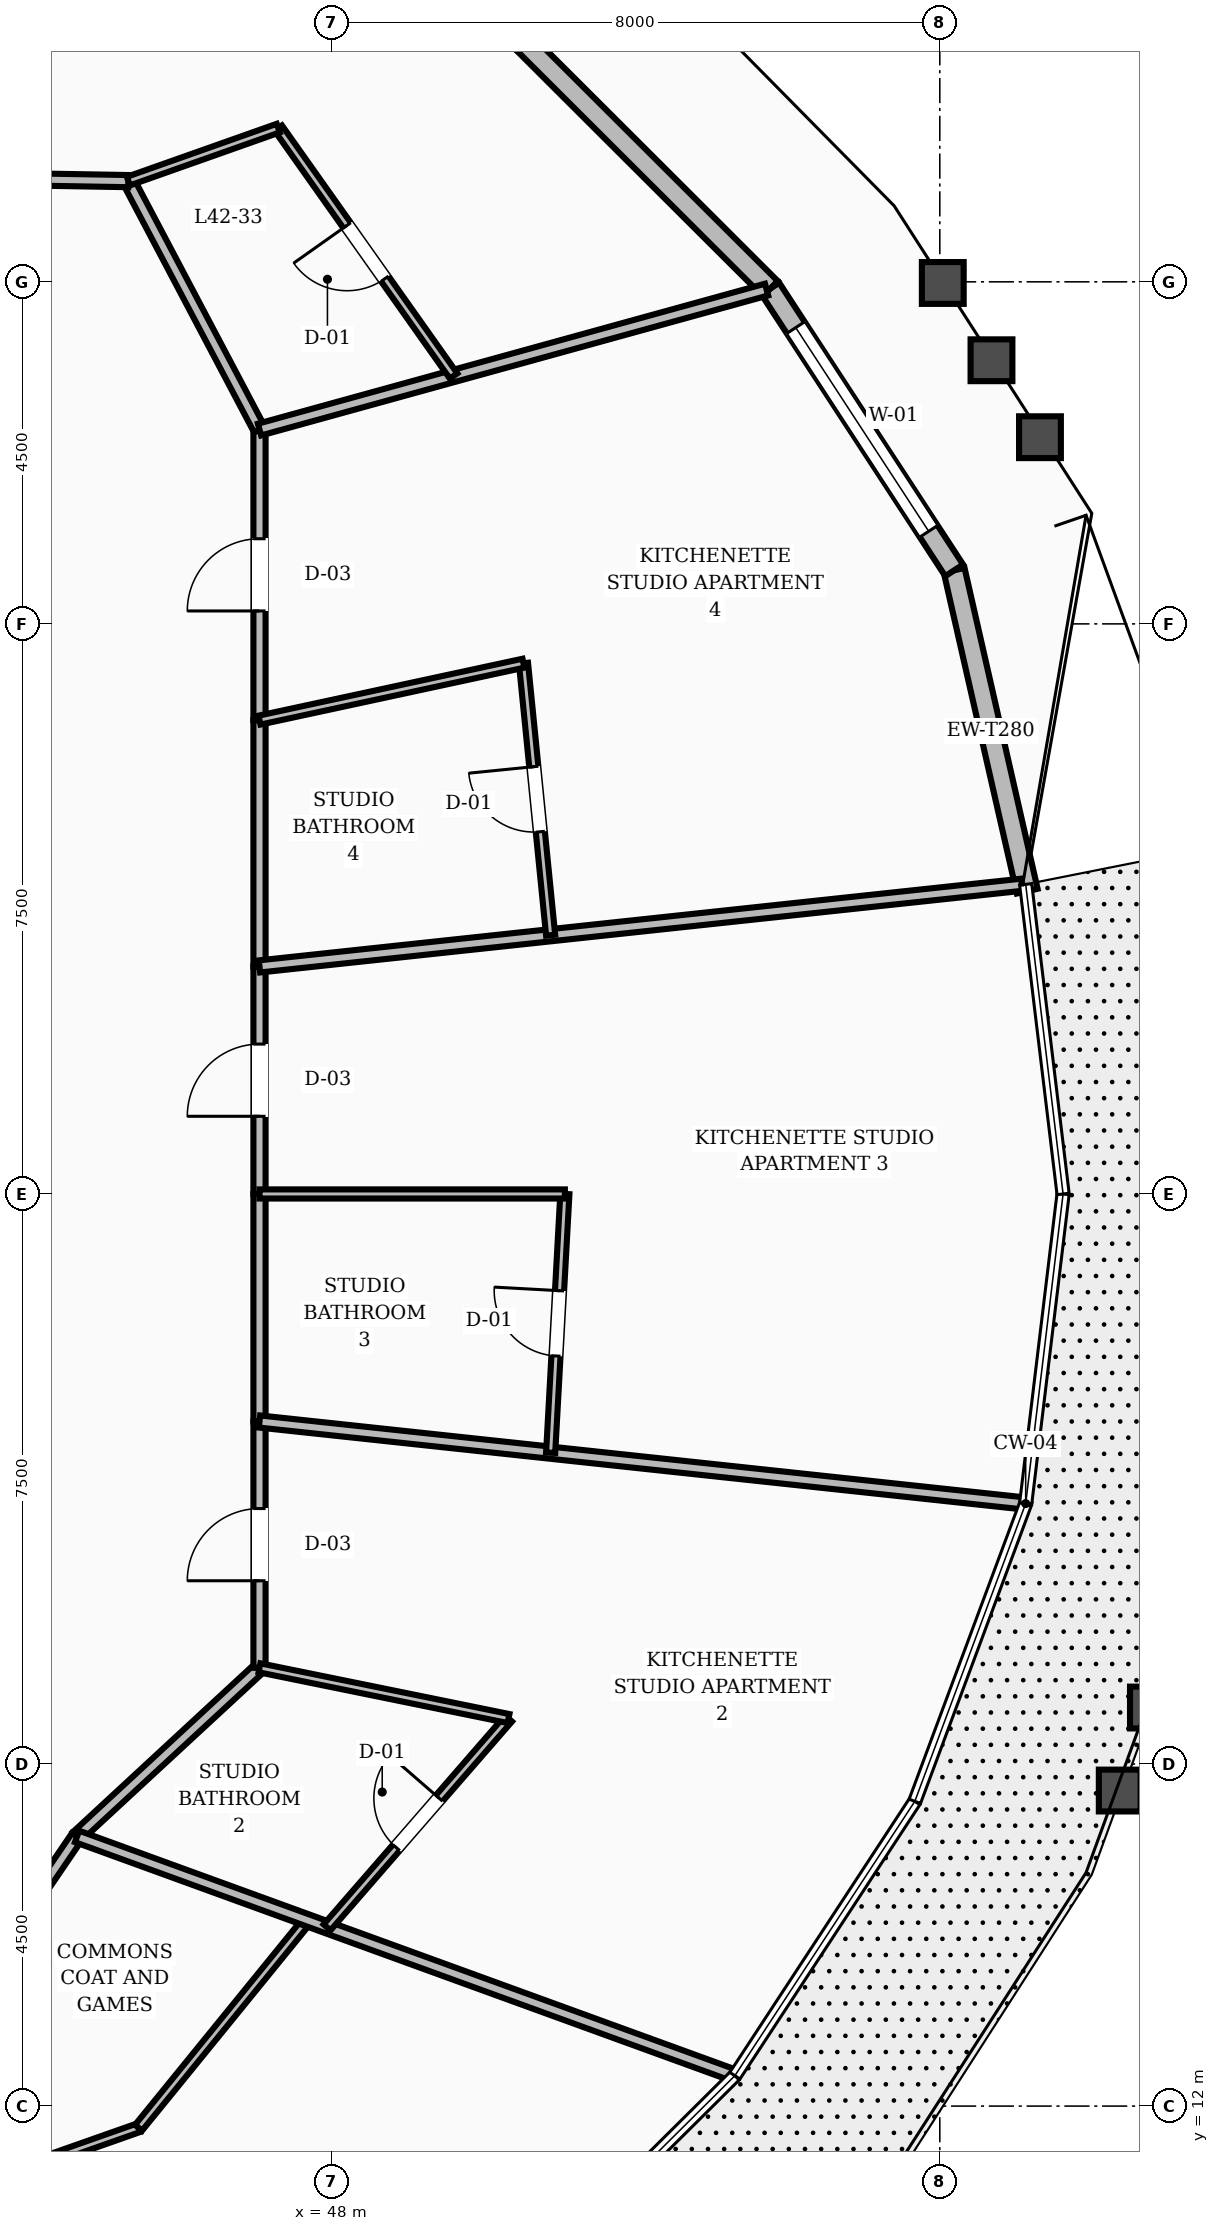
"""IFC4 building model, lengths in metres.
Left out: names, types, materials, properties, quantities, classifications, styles, units other than length and angle.
Written with IfcOpenShell. Run it as: python <this file> out.ifc"""

import sys

from ifc_helpers import new_model, si_unit, direction, frame, frame_2d, origin, place, context, subcontext, project, spatial, rectangle, extrude, element, fill, save


model = new_model("IFC4")
c1 = context("Model", 3, precision=1e-05, world=origin(), true_north=direction((0.0, 1.0)))
c2 = subcontext(c1, "Body", "Model", "MODEL_VIEW")
j1 = project(units=[si_unit("LENGTHUNIT", "METRE"), si_unit("PLANEANGLEUNIT", "RADIAN")], contexts=[c1])
p1 = place(None, origin())
s1 = spatial("IfcSite", under=j1, at=p1, CompositionType="ELEMENT")
p2 = place(p1, origin())
s2 = spatial("IfcBuilding", under=s1, at=p2, CompositionType="ELEMENT")
p3 = place(p2, frame((0.0, 0.0, 164.0)))
s3 = spatial("IfcBuildingStorey", under=s2, at=p3, CompositionType="ELEMENT", Elevation=164.0)
p4 = place(p3, frame((57.15, 27.984, 0.0), z_axis=(0.0, 0.0, 1.0), x_axis=(-0.222033033123, 0.975039143933, 0.0)))
e1 = element("IfcWall", 1, at=p4, inside=s3, PredefinedType="STANDARD", context=c2, shape_type="SweptSolid", body=[
    extrude(rectangle(XDim=4.329, YDim=0.28, at=frame_2d((2.165, 0.0))), origin(), (0.0, 0.0, 1.0), 2.82),
])
p5 = place(p3, frame((56.189, 32.205, 0.0), z_axis=(0.0, 0.0, 1.0), x_axis=(-0.546604237051, 0.837391072342, 0.0)))
e2 = element("IfcWall", 2, at=p5, inside=s3, PredefinedType="STANDARD", context=c2, shape_type="SweptSolid", body=[
    extrude(rectangle(XDim=4.426, YDim=0.28, at=frame_2d((2.213, 0.0))), origin(), (0.0, 0.0, 1.0), 2.82),
])
p6 = place(p5, frame((0.613, 0.0, 0.8)))
e3 = element("IfcOpeningElement", 3, at=p6, cuts=e2, PredefinedType="OPENING", context=c2, shape_type="SweptSolid", body=[
    extrude(rectangle(XDim=3.2, YDim=1.65, at=frame_2d((1.6, 0.825))), frame((0.0, 0.15, 0.0), z_axis=(0.0, -1.0, 0.0), x_axis=(1.0, 0.0, 0.0)), (0.0, 0.0, 1.0), 0.3),
])
p7 = place(p3, frame((53.77, 35.911, 0.0), z_axis=(0.0, 0.0, 1.0), x_axis=(-0.70790250433, 0.706310161589, 0.0)))
e4 = element("IfcWall", 4, at=p7, inside=s3, PredefinedType="STANDARD", context=c2, shape_type="SweptSolid", body=[
    extrude(rectangle(XDim=4.6, YDim=0.28, at=frame_2d((2.3, 0.0))), origin(), (0.0, 0.0, 1.0), 2.82),
])
p8 = place(p3, frame((47.05, 24.0, 0.0), z_axis=(0.0, 0.0, 1.0), x_axis=(0.0, 1.0, 0.0)))
e5 = element("IfcWall", 5, at=p8, inside=s3, PredefinedType="SOLIDWALL", context=c2, shape_type="SweptSolid", body=[
    extrude(rectangle(XDim=2.994, YDim=0.16, at=frame_2d((1.497, 0.0))), origin(), (0.0, 0.0, 1.0), 2.8),
])
p9 = place(p8, frame((1.022, 0.0, 0.0)))
e6 = element("IfcOpeningElement", 6, at=p9, cuts=e5, PredefinedType="OPENING", context=c2, shape_type="SweptSolid", body=[
    extrude(rectangle(XDim=0.95, YDim=2.1, at=frame_2d((0.475, 1.05))), frame((0.0, 0.09, 0.0), z_axis=(0.0, -1.0, 0.0), x_axis=(1.0, 0.0, 0.0)), (0.0, 0.0, 1.0), 0.18),
])
p10 = place(p3, frame((47.05, 26.994, 0.0), z_axis=(0.0, 0.0, 1.0), x_axis=(0.0, 1.0, 0.0)))
e7 = element("IfcWall", 7, at=p10, inside=s3, PredefinedType="SOLIDWALL", context=c2, shape_type="SweptSolid", body=[
    extrude(rectangle(XDim=3.24, YDim=0.16, at=frame_2d((1.62, 0.0))), origin(), (0.0, 0.0, 1.0), 2.8),
])
p11 = place(p3, frame((47.05, 30.234, 0.0), z_axis=(0.0, 0.0, 1.0), x_axis=(0.0, 1.0, 0.0)))
e8 = element("IfcWall", 8, at=p11, inside=s3, PredefinedType="SOLIDWALL", context=c2, shape_type="SweptSolid", body=[
    extrude(rectangle(XDim=3.822, YDim=0.16, at=frame_2d((1.911, 0.0))), origin(), (0.0, 0.0, 1.0), 2.8),
])
p12 = place(p11, frame((1.436, 0.0, 0.0)))
e9 = element("IfcOpeningElement", 9, at=p12, cuts=e8, PredefinedType="OPENING", context=c2, shape_type="SweptSolid", body=[
    extrude(rectangle(XDim=0.95, YDim=2.1, at=frame_2d((0.475, 1.05))), frame((0.0, 0.09, 0.0), z_axis=(0.0, -1.0, 0.0), x_axis=(1.0, 0.0, 0.0)), (0.0, 0.0, 1.0), 0.18),
])
p13 = place(p3, frame((47.05, 34.056, 0.0), z_axis=(0.0, 0.0, 1.0), x_axis=(-0.466737093093, 0.884396113702, 0.0)))
e10 = element("IfcWall", 10, at=p13, inside=s3, PredefinedType="SOLIDWALL", context=c2, shape_type="SweptSolid", body=[
    extrude(rectangle(XDim=3.696, YDim=0.16, at=frame_2d((1.848, 0.0))), origin(), (0.0, 0.0, 1.0), 2.8),
])
p14 = place(p3, frame((45.325, 37.325, 0.0), z_axis=(0.0, 0.0, 1.0), x_axis=(-0.999853038912, 0.017143528788, 0.0)))
e11 = element("IfcWall", 11, at=p14, inside=s3, PredefinedType="SOLIDWALL", context=c2, shape_type="SweptSolid", body=[
    extrude(rectangle(XDim=4.372, YDim=0.16, at=frame_2d((2.186, 0.0))), origin(), (0.0, 0.0, 1.0), 2.8),
])
p15 = place(p14, frame((1.711, 0.0, 0.0)))
e12 = element("IfcOpeningElement", 12, at=p15, cuts=e11, PredefinedType="OPENING", context=c2, shape_type="SweptSolid", body=[
    extrude(rectangle(XDim=0.95, YDim=2.1, at=frame_2d((0.475, 1.05))), frame((0.0, 0.09, 0.0), z_axis=(0.0, -1.0, 0.0), x_axis=(1.0, 0.0, 0.0)), (0.0, 0.0, 1.0), 0.18),
])
p16 = place(p3, frame((42.95, 13.05, 0.0), z_axis=(0.0, 0.0, 1.0), x_axis=(0.562674669208, 0.826678423955, 0.0)))
e13 = element("IfcWall", 13, at=p16, inside=s3, PredefinedType="SOLIDWALL", context=c2, shape_type="SweptSolid", body=[
    extrude(rectangle(XDim=3.021, YDim=0.16, at=frame_2d((1.511, 0.0))), origin(), (0.0, 0.0, 1.0), 2.8),
])
p17 = place(p3, frame((44.65, 15.548, 0.0), z_axis=(0.0, 0.0, 1.0), x_axis=(0.734347936521, 0.678773237633, 0.0)))
e14 = element("IfcWall", 14, at=p17, inside=s3, PredefinedType="SOLIDWALL", context=c2, shape_type="SweptSolid", body=[
    extrude(rectangle(XDim=3.268, YDim=0.16, at=frame_2d((1.634, 0.0))), origin(), (0.0, 0.0, 1.0), 2.8),
])
p18 = place(p3, frame((47.05, 17.766, 0.0), z_axis=(0.0, 0.0, 1.0), x_axis=(0.0, 1.0, 0.0)))
e15 = element("IfcWall", 15, at=p18, inside=s3, PredefinedType="SOLIDWALL", context=c2, shape_type="SweptSolid", body=[
    extrude(rectangle(XDim=3.24, YDim=0.16, at=frame_2d((1.62, 0.0))), origin(), (0.0, 0.0, 1.0), 2.8),
])
p19 = place(p18, frame((1.145, 0.0, 0.0)))
e16 = element("IfcOpeningElement", 16, at=p19, cuts=e15, PredefinedType="OPENING", context=c2, shape_type="SweptSolid", body=[
    extrude(rectangle(XDim=0.95, YDim=2.1, at=frame_2d((0.475, 1.05))), frame((0.0, 0.09, 0.0), z_axis=(0.0, -1.0, 0.0), x_axis=(1.0, 0.0, 0.0)), (0.0, 0.0, 1.0), 0.18),
])
p20 = place(p3, frame((47.05, 21.006, 0.0), z_axis=(0.0, 0.0, 1.0), x_axis=(0.0, 1.0, 0.0)))
e17 = element("IfcWall", 17, at=p20, inside=s3, PredefinedType="SOLIDWALL", context=c2, shape_type="SweptSolid", body=[
    extrude(rectangle(XDim=2.994, YDim=0.16, at=frame_2d((1.497, 0.0))), origin(), (0.0, 0.0, 1.0), 2.8),
])
p21 = place(p3, frame((41.955, 10.481, 0.0), z_axis=(0.0, 0.0, 1.0), x_axis=(0.943218228091, 0.332173710875, 0.0)))
e18 = element("IfcWall", 18, at=p21, inside=s3, PredefinedType="PARTITIONING", context=c2, shape_type="SweptSolid", body=[
    extrude(rectangle(XDim=3.715, YDim=0.12, at=frame_2d((1.857, 0.0))), origin(), (0.0, 0.0, 1.0), 2.8),
])
p22 = place(p3, frame((45.459, 11.715, 0.0), z_axis=(0.0, 0.0, 1.0), x_axis=(0.630851136321, 0.775903888251, 0.0)))
e19 = element("IfcWall", 19, at=p22, inside=s3, PredefinedType="PARTITIONING", context=c2, shape_type="SweptSolid", body=[
    extrude(rectangle(XDim=3.519, YDim=0.12, at=frame_2d((1.76, 0.0))), origin(), (0.0, 0.0, 1.0), 2.8),
])
p23 = place(p3, frame((44.65, 15.548, 0.0), z_axis=(0.0, 0.0, 1.0), x_axis=(0.939767737395, -0.341813691579, 0.0)))
e20 = element("IfcWall", 20, at=p23, inside=s3, PredefinedType="SOLIDWALL", context=c2, shape_type="SweptSolid", body=[
    extrude(rectangle(XDim=9.159, YDim=0.16, at=frame_2d((4.58, 0.0))), origin(), (0.0, 0.0, 1.0), 2.8),
])
p24 = place(p3, frame((47.939, 14.351, 0.0), z_axis=(0.0, 0.0, 1.0), x_axis=(0.655979420757, 0.754778775233, 0.0)))
e21 = element("IfcWall", 21, at=p24, inside=s3, PredefinedType="PARTITIONING", context=c2, shape_type="SweptSolid", body=[
    extrude(rectangle(XDim=3.64, YDim=0.12, at=frame_2d((1.82, 0.0))), origin(), (0.0, 0.0, 1.0), 2.8),
])
p25 = place(p24, frame((1.39, 0.0, 0.0)))
e22 = element("IfcOpeningElement", 22, at=p25, cuts=e21, PredefinedType="OPENING", context=c2, shape_type="SweptSolid", body=[
    extrude(rectangle(XDim=0.86, YDim=2.1, at=frame_2d((0.43, 1.05))), frame((0.0, 0.07, 0.0), z_axis=(0.0, -1.0, 0.0), x_axis=(1.0, 0.0, 0.0)), (0.0, 0.0, 1.0), 0.14),
])
p26 = place(p3, frame((47.05, 17.766, 0.0), z_axis=(0.0, 0.0, 1.0), x_axis=(0.97987231708, -0.199625254463, 0.0)))
e23 = element("IfcWall", 23, at=p26, inside=s3, PredefinedType="PARTITIONING", context=c2, shape_type="SweptSolid", body=[
    extrude(rectangle(XDim=3.344, YDim=0.12, at=frame_2d((1.672, 0.0))), origin(), (0.0, 0.0, 1.0), 2.8),
])
p27 = place(p3, frame((47.05, 21.006, 0.0), z_axis=(0.0, 0.0, 1.0), x_axis=(0.994311076529, -0.106515177757, 0.0)))
e24 = element("IfcWall", 24, at=p27, inside=s3, PredefinedType="SOLIDWALL", context=c2, shape_type="SweptSolid", body=[
    extrude(rectangle(XDim=10.087, YDim=0.16, at=frame_2d((5.044, 0.0))), origin(), (0.0, 0.0, 1.0), 2.8),
])
p28 = place(p3, frame((50.88, 20.596, 0.0), z_axis=(0.0, 0.0, 1.0), x_axis=(0.054859165273, 0.998494102129, 0.0)))
e25 = element("IfcWall", 25, at=p28, inside=s3, PredefinedType="PARTITIONING", context=c2, shape_type="SweptSolid", body=[
    extrude(rectangle(XDim=3.409, YDim=0.12, at=frame_2d((1.705, 0.0))), origin(), (0.0, 0.0, 1.0), 2.8),
])
p29 = place(p28, frame((1.274, 0.0, 0.0)))
e26 = element("IfcOpeningElement", 26, at=p29, cuts=e25, PredefinedType="OPENING", context=c2, shape_type="SweptSolid", body=[
    extrude(rectangle(XDim=0.86, YDim=2.1, at=frame_2d((0.43, 1.05))), frame((0.0, 0.07, 0.0), z_axis=(0.0, -1.0, 0.0), x_axis=(1.0, 0.0, 0.0)), (0.0, 0.0, 1.0), 0.14),
])
p30 = place(p3, frame((47.05, 24.0, 0.0), z_axis=(0.0, 0.0, 1.0), x_axis=(1.0, 0.0, 0.0)))
e27 = element("IfcWall", 27, at=p30, inside=s3, PredefinedType="PARTITIONING", context=c2, shape_type="SweptSolid", body=[
    extrude(rectangle(XDim=4.017, YDim=0.12, at=frame_2d((2.009, 0.0))), origin(), (0.0, 0.0, 1.0), 2.8),
])
p31 = place(p3, frame((47.05, 26.994, 0.0), z_axis=(0.0, 0.0, 1.0), x_axis=(0.994311076529, 0.106515177757, 0.0)))
e28 = element("IfcWall", 28, at=p31, inside=s3, PredefinedType="SOLIDWALL", context=c2, shape_type="SweptSolid", body=[
    extrude(rectangle(XDim=10.087, YDim=0.16, at=frame_2d((5.044, 0.0))), origin(), (0.0, 0.0, 1.0), 2.8),
])
p32 = place(p3, frame((50.88, 27.404, 0.0), z_axis=(0.0, 0.0, 1.0), x_axis=(-0.099376023533, 0.995049951483, 0.0)))
e29 = element("IfcWall", 29, at=p32, inside=s3, PredefinedType="PARTITIONING", context=c2, shape_type="SweptSolid", body=[
    extrude(rectangle(XDim=3.597, YDim=0.12, at=frame_2d((1.798, 0.0))), origin(), (0.0, 0.0, 1.0), 2.8),
])
p33 = place(p32, frame((1.368, 0.0, 0.0)))
e30 = element("IfcOpeningElement", 30, at=p33, cuts=e29, PredefinedType="OPENING", context=c2, shape_type="SweptSolid", body=[
    extrude(rectangle(XDim=0.86, YDim=2.1, at=frame_2d((0.43, 1.05))), frame((0.0, 0.07, 0.0), z_axis=(0.0, -1.0, 0.0), x_axis=(1.0, 0.0, 0.0)), (0.0, 0.0, 1.0), 0.14),
])
p34 = place(p3, frame((47.05, 30.234, 0.0), z_axis=(0.0, 0.0, 1.0), x_axis=(0.977537148189, 0.210763193919, 0.0)))
e31 = element("IfcWall", 31, at=p34, inside=s3, PredefinedType="PARTITIONING", context=c2, shape_type="SweptSolid", body=[
    extrude(rectangle(XDim=3.553, YDim=0.12, at=frame_2d((1.776, 0.0))), origin(), (0.0, 0.0, 1.0), 2.8),
])
p35 = place(p3, frame((47.05, 34.056, 0.0), z_axis=(0.0, 0.0, 1.0), x_axis=(0.963949260869, 0.266086118522, 0.0)))
e32 = element("IfcWall", 32, at=p35, inside=s3, PredefinedType="SOLIDWALL", context=c2, shape_type="SweptSolid", body=[
    extrude(rectangle(XDim=6.921, YDim=0.16, at=frame_2d((3.46, 0.0))), origin(), (0.0, 0.0, 1.0), 2.8),
])
p36 = place(p3, frame((49.604, 34.761, 0.0), z_axis=(0.0, 0.0, 1.0), x_axis=(-0.57749154671, 0.816396664299, 0.0)))
e33 = element("IfcWall", 33, at=p36, inside=s3, PredefinedType="PARTITIONING", context=c2, shape_type="SweptSolid", body=[
    extrude(rectangle(XDim=3.995, YDim=0.12, at=frame_2d((1.997, 0.0))), origin(), (0.0, 0.0, 1.0), 2.8),
])
p37 = place(p36, frame((1.567, 0.0, 0.0)))
e34 = element("IfcOpeningElement", 34, at=p37, cuts=e33, PredefinedType="OPENING", context=c2, shape_type="SweptSolid", body=[
    extrude(rectangle(XDim=0.86, YDim=2.1, at=frame_2d((0.43, 1.05))), frame((0.0, 0.07, 0.0), z_axis=(0.0, -1.0, 0.0), x_axis=(1.0, 0.0, 0.0)), (0.0, 0.0, 1.0), 0.14),
])
p38 = place(p3, frame((45.325, 37.325, 0.0), z_axis=(0.0, 0.0, 1.0), x_axis=(0.942783254147, 0.333406262239, 0.0)))
e35 = element("IfcWall", 35, at=p38, inside=s3, PredefinedType="PARTITIONING", context=c2, shape_type="SweptSolid", body=[
    extrude(rectangle(XDim=2.091, YDim=0.12, at=frame_2d((1.046, 0.0))), origin(), (0.0, 0.0, 1.0), 2.8),
])
p39 = place(p3, frame((40.954, 37.4, 0.0), z_axis=(0.0, 0.0, 1.0), x_axis=(0.784100343869, 0.62063407153, 0.0)))
e36 = element("IfcWall", 36, at=p39, inside=s3, PredefinedType="SOLIDWALL", context=c2, shape_type="SweptSolid", body=[
    extrude(rectangle(XDim=7.082, YDim=0.16, at=frame_2d((3.541, 0.0))), origin(), (0.0, 0.0, 1.0), 2.8),
])
p40 = place(p6, origin())
e37 = element("IfcWindow", 37, at=p40, inside=s3, PartitioningType="SINGLE_PANEL", PredefinedType="WINDOW", context=c2, shape_type="SweptSolid", body=[
    extrude(rectangle(XDim=3.2, YDim=1.65, at=frame_2d((1.6, 0.825))), frame((0.0, 0.03, 0.0), z_axis=(0.0, -1.0, 0.0), x_axis=(1.0, 0.0, 0.0)), (0.0, 0.0, 1.0), 0.06),
])
fill(e3, e37)
p41 = place(p25, origin())
e38 = element("IfcDoor", 38, at=p41, inside=s3, OperationType="SINGLE_SWING_RIGHT", PredefinedType="DOOR", context=c2, shape_type="SweptSolid", body=[
    extrude(rectangle(XDim=0.86, YDim=2.1, at=frame_2d((0.43, 1.05))), frame((0.0, 0.025, 0.0), z_axis=(0.0, -1.0, 0.0), x_axis=(1.0, 0.0, 0.0)), (0.0, 0.0, 1.0), 0.05),
])
fill(e22, e38)
p42 = place(p19, origin())
e39 = element("IfcDoor", 39, at=p42, inside=s3, OperationType="SINGLE_SWING_LEFT", PredefinedType="DOOR", context=c2, shape_type="SweptSolid", body=[
    extrude(rectangle(XDim=0.95, YDim=2.1, at=frame_2d((0.475, 1.05))), frame((0.0, 0.025, 0.0), z_axis=(0.0, -1.0, 0.0), x_axis=(1.0, 0.0, 0.0)), (0.0, 0.0, 1.0), 0.05),
])
fill(e16, e39)
p43 = place(p29, origin())
e40 = element("IfcDoor", 40, at=p43, inside=s3, OperationType="SINGLE_SWING_RIGHT", PredefinedType="DOOR", context=c2, shape_type="SweptSolid", body=[
    extrude(rectangle(XDim=0.86, YDim=2.1, at=frame_2d((0.43, 1.05))), frame((0.0, 0.025, 0.0), z_axis=(0.0, -1.0, 0.0), x_axis=(1.0, 0.0, 0.0)), (0.0, 0.0, 1.0), 0.05),
])
fill(e26, e40)
p44 = place(p9, origin())
e41 = element("IfcDoor", 41, at=p44, inside=s3, OperationType="SINGLE_SWING_LEFT", PredefinedType="DOOR", context=c2, shape_type="SweptSolid", body=[
    extrude(rectangle(XDim=0.95, YDim=2.1, at=frame_2d((0.475, 1.05))), frame((0.0, 0.025, 0.0), z_axis=(0.0, -1.0, 0.0), x_axis=(1.0, 0.0, 0.0)), (0.0, 0.0, 1.0), 0.05),
])
fill(e6, e41)
p45 = place(p33, origin())
e42 = element("IfcDoor", 42, at=p45, inside=s3, OperationType="SINGLE_SWING_RIGHT", PredefinedType="DOOR", context=c2, shape_type="SweptSolid", body=[
    extrude(rectangle(XDim=0.86, YDim=2.1, at=frame_2d((0.43, 1.05))), frame((0.0, 0.025, 0.0), z_axis=(0.0, -1.0, 0.0), x_axis=(1.0, 0.0, 0.0)), (0.0, 0.0, 1.0), 0.05),
])
fill(e30, e42)
p46 = place(p12, origin())
e43 = element("IfcDoor", 43, at=p46, inside=s3, OperationType="SINGLE_SWING_LEFT", PredefinedType="DOOR", context=c2, shape_type="SweptSolid", body=[
    extrude(rectangle(XDim=0.95, YDim=2.1, at=frame_2d((0.475, 1.05))), frame((0.0, 0.025, 0.0), z_axis=(0.0, -1.0, 0.0), x_axis=(1.0, 0.0, 0.0)), (0.0, 0.0, 1.0), 0.05),
])
fill(e9, e43)
p47 = place(p37, origin())
e44 = element("IfcDoor", 44, at=p47, inside=s3, OperationType="SINGLE_SWING_RIGHT", PredefinedType="DOOR", context=c2, shape_type="SweptSolid", body=[
    extrude(rectangle(XDim=0.86, YDim=2.1, at=frame_2d((0.43, 1.05))), frame((0.0, 0.025, 0.0), z_axis=(0.0, -1.0, 0.0), x_axis=(1.0, 0.0, 0.0)), (0.0, 0.0, 1.0), 0.05),
])
fill(e34, e44)
save(model, sys.argv[1])
